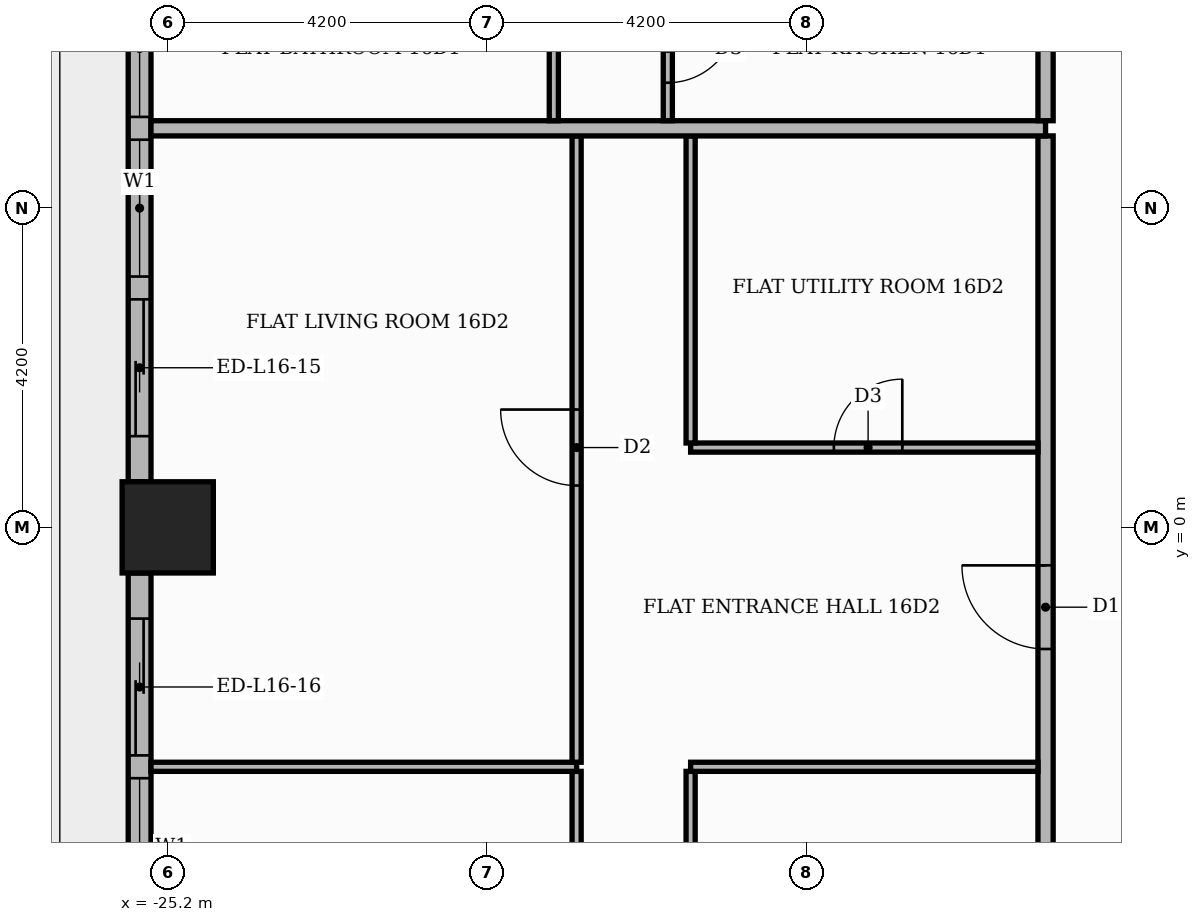
"""IFC4 building model, lengths in metres.
Left out: names, types, materials, properties, quantities, classifications, styles, units other than length and angle.
Written with IfcOpenShell. Run it as: python <this file> out.ifc"""

import sys

from ifc_helpers import new_model, si_unit, direction, frame, frame_2d, origin, origin_2d, place, context, subcontext, project, spatial, rectangle, extrude, element, fill, save


model = new_model("IFC4")
c1 = context("Model", 3, precision=1e-05, world=origin(), true_north=direction((0.0, 1.0)))
c2 = subcontext(c1, "Body", "Model", "MODEL_VIEW")
j1 = project(units=[si_unit("LENGTHUNIT", "METRE"), si_unit("PLANEANGLEUNIT", "RADIAN")], contexts=[c1])
p1 = place(None, origin())
s1 = spatial("IfcSite", under=j1, at=p1, CompositionType="ELEMENT")
p2 = place(p1, origin())
s2 = spatial("IfcBuilding", under=s1, at=p2, CompositionType="ELEMENT")
p3 = place(p2, frame((0.0, 0.0, 69.9)))
s3 = spatial("IfcBuildingStorey", under=s2, at=p3, CompositionType="ELEMENT", Elevation=69.9)
p4 = place(p3, frame((-25.2, 0.0, 0.0), z_axis=(0.0, 0.0, 1.0), x_axis=(1.0, 0.0, 0.0)))
e1 = element("IfcColumn", 1, at=p4, inside=s3, PredefinedType="COLUMN", context=c2, shape_type="SweptSolid", body=[
    extrude(rectangle(XDim=1.2, YDim=1.2, at=origin_2d()), origin(), (0.0, 0.0, 1.0), 3.9),
])
p5 = place(p3, frame((-25.57, 7.8, 0.0), z_axis=(0.0, 0.0, 1.0), x_axis=(0.0, -1.0, 0.0)))
e2 = element("IfcWall", 2, at=p5, inside=s3, PredefinedType="STANDARD", context=c2, shape_type="SweptSolid", body=[
    extrude(rectangle(XDim=7.2, YDim=0.3, at=frame_2d((3.6, 0.0))), origin(), (0.0, 0.0, 1.0), 3.4),
])
p6 = place(p5, frame((0.6, 0.0, 0.9)))
e3 = element("IfcOpeningElement", 3, at=p6, cuts=e2, PredefinedType="OPENING", context=c2, shape_type="SweptSolid", body=[
    extrude(rectangle(XDim=1.8, YDim=2.1, at=frame_2d((0.9, 1.05))), frame((0.0, 0.16, 0.0), z_axis=(0.0, -1.0, 0.0), x_axis=(1.0, 0.0, 0.0)), (0.0, 0.0, 1.0), 0.32),
])
p7 = place(p5, frame((2.7, 0.0, 0.9)))
e4 = element("IfcOpeningElement", 4, at=p7, cuts=e2, PredefinedType="OPENING", context=c2, shape_type="SweptSolid", body=[
    extrude(rectangle(XDim=1.8, YDim=2.1, at=frame_2d((0.9, 1.05))), frame((0.0, 0.16, 0.0), z_axis=(0.0, -1.0, 0.0), x_axis=(1.0, 0.0, 0.0)), (0.0, 0.0, 1.0), 0.32),
])
p8 = place(p5, frame((4.8, 0.0, 0.0)))
e5 = element("IfcOpeningElement", 5, at=p8, cuts=e2, PredefinedType="OPENING", context=c2, shape_type="SweptSolid", body=[
    extrude(rectangle(XDim=1.8, YDim=2.4, at=frame_2d((0.9, 1.2))), frame((0.0, 0.16, 0.0), z_axis=(0.0, -1.0, 0.0), x_axis=(1.0, 0.0, 0.0)), (0.0, 0.0, 1.0), 0.32),
])
p9 = place(p3, frame((-25.57, -0.6, 0.0), z_axis=(0.0, 0.0, 1.0), x_axis=(0.0, -1.0, 0.0)))
e6 = element("IfcWall", 6, at=p9, inside=s3, PredefinedType="STANDARD", context=c2, shape_type="SweptSolid", body=[
    extrude(rectangle(XDim=7.2, YDim=0.3, at=frame_2d((3.6, 0.0))), origin(), (0.0, 0.0, 1.0), 3.4),
])
p10 = place(p9, frame((0.6, 0.0, 0.0)))
e7 = element("IfcOpeningElement", 7, at=p10, cuts=e6, PredefinedType="OPENING", context=c2, shape_type="SweptSolid", body=[
    extrude(rectangle(XDim=1.8, YDim=2.4, at=frame_2d((0.9, 1.2))), frame((0.0, 0.16, 0.0), z_axis=(0.0, -1.0, 0.0), x_axis=(1.0, 0.0, 0.0)), (0.0, 0.0, 1.0), 0.32),
])
p11 = place(p9, frame((2.7, 0.0, 0.9)))
e8 = element("IfcOpeningElement", 8, at=p11, cuts=e6, PredefinedType="OPENING", context=c2, shape_type="SweptSolid", body=[
    extrude(rectangle(XDim=1.8, YDim=2.1, at=frame_2d((0.9, 1.05))), frame((0.0, 0.16, 0.0), z_axis=(0.0, -1.0, 0.0), x_axis=(1.0, 0.0, 0.0)), (0.0, 0.0, 1.0), 0.32),
])
p12 = place(p9, frame((4.8, 0.0, 0.0)))
e9 = element("IfcOpeningElement", 9, at=p12, cuts=e6, PredefinedType="OPENING", context=c2, shape_type="SweptSolid", body=[
    extrude(rectangle(XDim=1.8, YDim=2.4, at=frame_2d((0.9, 1.2))), frame((0.0, 0.16, 0.0), z_axis=(0.0, -1.0, 0.0), x_axis=(1.0, 0.0, 0.0)), (0.0, 0.0, 1.0), 0.32),
])
p13 = place(p3, frame((-13.65, -13.55, 0.0), z_axis=(0.0, 0.0, 1.0), x_axis=(0.0, 1.0, 0.0)))
e10 = element("IfcWall", 10, at=p13, inside=s3, PredefinedType="PARTITIONING", context=c2, shape_type="SweptSolid", body=[
    extrude(rectangle(XDim=18.7, YDim=0.2, at=frame_2d((9.35, 0.0))), origin(), (0.0, 0.0, 1.0), 3.4),
])
p14 = place(p13, frame((11.95, 0.0, 0.0)))
e11 = element("IfcOpeningElement", 11, at=p14, cuts=e10, PredefinedType="OPENING", context=c2, shape_type="SweptSolid", body=[
    extrude(rectangle(XDim=1.1, YDim=2.4, at=frame_2d((0.55, 1.2))), frame((0.0, 0.11, 0.0), z_axis=(0.0, -1.0, 0.0), x_axis=(1.0, 0.0, 0.0)), (0.0, 0.0, 1.0), 0.22),
])
p15 = place(p3, frame((-19.82, -9.39, 0.0), z_axis=(0.0, 0.0, 1.0), x_axis=(0.0, 1.0, 0.0)))
e12 = element("IfcWall", 12, at=p15, inside=s3, PredefinedType="PARTITIONING", context=c2, shape_type="SweptSolid", body=[
    extrude(rectangle(XDim=6.18, YDim=0.12, at=frame_2d((3.09, 0.0))), origin(), (0.0, 0.0, 1.0), 3.4),
])
p16 = place(p15, frame((2.64, 0.0, 0.0)))
e13 = element("IfcOpeningElement", 13, at=p16, cuts=e12, PredefinedType="OPENING", context=c2, shape_type="SweptSolid", body=[
    extrude(rectangle(XDim=0.9, YDim=2.1, at=frame_2d((0.45, 1.05))), frame((0.0, 0.07, 0.0), z_axis=(0.0, -1.0, 0.0), x_axis=(1.0, 0.0, 0.0)), (0.0, 0.0, 1.0), 0.14),
])
p17 = place(p3, frame((-18.32, -8.94, 0.0), z_axis=(0.0, 0.0, 1.0), x_axis=(0.0, 1.0, 0.0)))
e14 = element("IfcWall", 14, at=p17, inside=s3, PredefinedType="PARTITIONING", context=c2, shape_type="SweptSolid", body=[
    extrude(rectangle(XDim=5.73, YDim=0.12, at=frame_2d((2.865, 0.0))), origin(), (0.0, 0.0, 1.0), 3.4),
])
p18 = place(p17, frame((2.415, 0.0, 0.0)))
e15 = element("IfcOpeningElement", 15, at=p18, cuts=e14, PredefinedType="OPENING", context=c2, shape_type="SweptSolid", body=[
    extrude(rectangle(XDim=0.9, YDim=2.1, at=frame_2d((0.45, 1.05))), frame((0.0, 0.07, 0.0), z_axis=(0.0, -1.0, 0.0), x_axis=(1.0, 0.0, 0.0)), (0.0, 0.0, 1.0), 0.14),
])
p19 = place(p3, frame((-25.42, -3.15, 0.0), z_axis=(0.0, 0.0, 1.0), x_axis=(1.0, 0.0, 0.0)))
e16 = element("IfcWall", 16, at=p19, inside=s3, PredefinedType="PARTITIONING", context=c2, shape_type="SweptSolid", body=[
    extrude(rectangle(XDim=5.6, YDim=0.12, at=frame_2d((2.8, 0.0))), origin(), (0.0, 0.0, 1.0), 3.4),
])
p20 = place(p3, frame((-18.32, -3.15, 0.0), z_axis=(0.0, 0.0, 1.0), x_axis=(1.0, 0.0, 0.0)))
e17 = element("IfcWall", 17, at=p20, inside=s3, PredefinedType="PARTITIONING", context=c2, shape_type="SweptSolid", body=[
    extrude(rectangle(XDim=4.57, YDim=0.12, at=frame_2d((2.285, 0.0))), origin(), (0.0, 0.0, 1.0), 3.4),
])
p21 = place(p3, frame((-19.82, -3.09, 0.0), z_axis=(0.0, 0.0, 1.0), x_axis=(0.0, 1.0, 0.0)))
e18 = element("IfcWall", 18, at=p21, inside=s3, PredefinedType="PARTITIONING", context=c2, shape_type="SweptSolid", body=[
    extrude(rectangle(XDim=8.24, YDim=0.12, at=frame_2d((4.12, 0.0))), origin(), (0.0, 0.0, 1.0), 3.4),
])
p22 = place(p21, frame((3.64, 0.0, 0.0)))
e19 = element("IfcOpeningElement", 19, at=p22, cuts=e18, PredefinedType="OPENING", context=c2, shape_type="SweptSolid", body=[
    extrude(rectangle(XDim=1.0, YDim=2.1, at=frame_2d((0.5, 1.05))), frame((0.0, 0.07, 0.0), z_axis=(0.0, -1.0, 0.0), x_axis=(1.0, 0.0, 0.0)), (0.0, 0.0, 1.0), 0.14),
])
p23 = place(p3, frame((-18.32, 1.05, 0.0), z_axis=(0.0, 0.0, 1.0), x_axis=(1.0, 0.0, 0.0)))
e20 = element("IfcWall", 20, at=p23, inside=s3, PredefinedType="PARTITIONING", context=c2, shape_type="SweptSolid", body=[
    extrude(rectangle(XDim=4.57, YDim=0.12, at=frame_2d((2.285, 0.0))), origin(), (0.0, 0.0, 1.0), 3.4),
])
p24 = place(p23, frame((1.885, 0.0, 0.0)))
e21 = element("IfcOpeningElement", 21, at=p24, cuts=e20, PredefinedType="OPENING", context=c2, shape_type="SweptSolid", body=[
    extrude(rectangle(XDim=0.9, YDim=2.1, at=frame_2d((0.45, 1.05))), frame((0.0, 0.07, 0.0), z_axis=(0.0, -1.0, 0.0), x_axis=(1.0, 0.0, 0.0)), (0.0, 0.0, 1.0), 0.14),
])
p25 = place(p3, frame((-18.32, 1.11, 0.0), z_axis=(0.0, 0.0, 1.0), x_axis=(0.0, 1.0, 0.0)))
e22 = element("IfcWall", 22, at=p25, inside=s3, PredefinedType="PARTITIONING", context=c2, shape_type="SweptSolid", body=[
    extrude(rectangle(XDim=4.04, YDim=0.12, at=frame_2d((2.02, 0.0))), origin(), (0.0, 0.0, 1.0), 3.4),
])
p26 = place(p3, frame((-25.42, 5.25, 0.0), z_axis=(0.0, 0.0, 1.0), x_axis=(1.0, 0.0, 0.0)))
e23 = element("IfcWall", 23, at=p26, inside=s3, PredefinedType="PARTITIONING", context=c2, shape_type="SweptSolid", body=[
    extrude(rectangle(XDim=11.77, YDim=0.2, at=frame_2d((5.885, 0.0))), origin(), (0.0, 0.0, 1.0), 3.4),
])
p27 = place(p3, frame((-20.12, 5.35, 0.0), z_axis=(0.0, 0.0, 1.0), x_axis=(0.0, 1.0, 0.0)))
e24 = element("IfcWall", 24, at=p27, inside=s3, PredefinedType="PARTITIONING", context=c2, shape_type="SweptSolid", body=[
    extrude(rectangle(XDim=1.94, YDim=0.12, at=frame_2d((0.97, 0.0))), origin(), (0.0, 0.0, 1.0), 3.4),
])
p28 = place(p3, frame((-18.62, 5.35, 0.0), z_axis=(0.0, 0.0, 1.0), x_axis=(0.0, 1.0, 0.0)))
e25 = element("IfcWall", 25, at=p28, inside=s3, PredefinedType="PARTITIONING", context=c2, shape_type="SweptSolid", body=[
    extrude(rectangle(XDim=1.94, YDim=0.12, at=frame_2d((0.97, 0.0))), origin(), (0.0, 0.0, 1.0), 3.4),
])
p29 = place(p28, frame((0.5, 0.0, 0.0)))
e26 = element("IfcOpeningElement", 26, at=p29, cuts=e25, PredefinedType="OPENING", context=c2, shape_type="SweptSolid", body=[
    extrude(rectangle(XDim=0.9, YDim=2.1, at=frame_2d((0.45, 1.05))), frame((0.0, 0.07, 0.0), z_axis=(0.0, -1.0, 0.0), x_axis=(1.0, 0.0, 0.0)), (0.0, 0.0, 1.0), 0.14),
])
p30 = place(p3, frame((-13.65, 5.35, 0.0), z_axis=(0.0, 0.0, 1.0), x_axis=(0.0, 1.0, 0.0)))
e27 = element("IfcWall", 27, at=p30, inside=s3, PredefinedType="PARTITIONING", context=c2, shape_type="SweptSolid", body=[
    extrude(rectangle(XDim=8.2, YDim=0.2, at=frame_2d((4.1, 0.0))), origin(), (0.0, 0.0, 1.0), 3.4),
])
p31 = place(p30, frame((5.65, 0.0, 0.0)))
e28 = element("IfcOpeningElement", 28, at=p31, cuts=e27, PredefinedType="OPENING", context=c2, shape_type="SweptSolid", body=[
    extrude(rectangle(XDim=1.1, YDim=2.4, at=frame_2d((0.55, 1.2))), frame((0.0, 0.11, 0.0), z_axis=(0.0, -1.0, 0.0), x_axis=(1.0, 0.0, 0.0)), (0.0, 0.0, 1.0), 0.22),
])
p32 = place(p6, origin())
e29 = element("IfcWindow", 29, at=p32, inside=s3, PartitioningType="SINGLE_PANEL", PredefinedType="WINDOW", context=c2, shape_type="SweptSolid", body=[
    extrude(rectangle(XDim=1.8, YDim=2.1, at=frame_2d((0.9, 1.05))), frame((0.0, 0.03, 0.0), z_axis=(0.0, -1.0, 0.0), x_axis=(1.0, 0.0, 0.0)), (0.0, 0.0, 1.0), 0.06),
])
fill(e3, e29)
p33 = place(p7, origin())
e30 = element("IfcWindow", 30, at=p33, inside=s3, PartitioningType="SINGLE_PANEL", PredefinedType="WINDOW", context=c2, shape_type="SweptSolid", body=[
    extrude(rectangle(XDim=1.8, YDim=2.1, at=frame_2d((0.9, 1.05))), frame((0.0, 0.03, 0.0), z_axis=(0.0, -1.0, 0.0), x_axis=(1.0, 0.0, 0.0)), (0.0, 0.0, 1.0), 0.06),
])
fill(e4, e30)
p34 = place(p8, origin())
e31 = element("IfcDoor", 31, at=p34, inside=s3, OperationType="SLIDING_TO_RIGHT", PredefinedType="DOOR", context=c2, shape_type="SweptSolid", body=[
    extrude(rectangle(XDim=1.8, YDim=2.4, at=frame_2d((0.9, 1.2))), frame((0.0, 0.025, 0.0), z_axis=(0.0, -1.0, 0.0), x_axis=(1.0, 0.0, 0.0)), (0.0, 0.0, 1.0), 0.05),
])
fill(e5, e31)
p35 = place(p10, origin())
e32 = element("IfcDoor", 32, at=p35, inside=s3, OperationType="SLIDING_TO_LEFT", PredefinedType="DOOR", context=c2, shape_type="SweptSolid", body=[
    extrude(rectangle(XDim=1.8, YDim=2.4, at=frame_2d((0.9, 1.2))), frame((0.0, 0.025, 0.0), z_axis=(0.0, -1.0, 0.0), x_axis=(1.0, 0.0, 0.0)), (0.0, 0.0, 1.0), 0.05),
])
fill(e7, e32)
p36 = place(p11, origin())
e33 = element("IfcWindow", 33, at=p36, inside=s3, PartitioningType="SINGLE_PANEL", PredefinedType="WINDOW", context=c2, shape_type="SweptSolid", body=[
    extrude(rectangle(XDim=1.8, YDim=2.1, at=frame_2d((0.9, 1.05))), frame((0.0, 0.03, 0.0), z_axis=(0.0, -1.0, 0.0), x_axis=(1.0, 0.0, 0.0)), (0.0, 0.0, 1.0), 0.06),
])
fill(e8, e33)
p37 = place(p29, frame((0.9, 0.0, 0.0), z_axis=(0.0, 0.0, 1.0), x_axis=(-1.0, 0.0, 0.0)))
e34 = element("IfcDoor", 34, at=p37, inside=s3, OperationType="SINGLE_SWING_RIGHT", PredefinedType="DOOR", context=c2, shape_type="SweptSolid", body=[
    extrude(rectangle(XDim=0.9, YDim=2.1, at=frame_2d((0.45, 1.05))), frame((0.0, 0.025, 0.0), z_axis=(0.0, -1.0, 0.0), x_axis=(1.0, 0.0, 0.0)), (0.0, 0.0, 1.0), 0.05),
])
fill(e26, e34)
p38 = place(p14, origin())
e35 = element("IfcDoor", 35, at=p38, inside=s3, OperationType="SINGLE_SWING_RIGHT", PredefinedType="DOOR", context=c2, shape_type="SweptSolid", body=[
    extrude(rectangle(XDim=1.1, YDim=2.4, at=frame_2d((0.55, 1.2))), frame((0.0, 0.025, 0.0), z_axis=(0.0, -1.0, 0.0), x_axis=(1.0, 0.0, 0.0)), (0.0, 0.0, 1.0), 0.05),
])
fill(e11, e35)
p39 = place(p24, origin())
e36 = element("IfcDoor", 36, at=p39, inside=s3, OperationType="SINGLE_SWING_RIGHT", PredefinedType="DOOR", context=c2, shape_type="SweptSolid", body=[
    extrude(rectangle(XDim=0.9, YDim=2.1, at=frame_2d((0.45, 1.05))), frame((0.0, 0.025, 0.0), z_axis=(0.0, -1.0, 0.0), x_axis=(1.0, 0.0, 0.0)), (0.0, 0.0, 1.0), 0.05),
])
fill(e21, e36)
p40 = place(p22, origin())
e37 = element("IfcDoor", 37, at=p40, inside=s3, OperationType="SINGLE_SWING_RIGHT", PredefinedType="DOOR", context=c2, shape_type="SweptSolid", body=[
    extrude(rectangle(XDim=1.0, YDim=2.1, at=frame_2d((0.5, 1.05))), frame((0.0, 0.025, 0.0), z_axis=(0.0, -1.0, 0.0), x_axis=(1.0, 0.0, 0.0)), (0.0, 0.0, 1.0), 0.05),
])
fill(e19, e37)
save(model, sys.argv[1])
